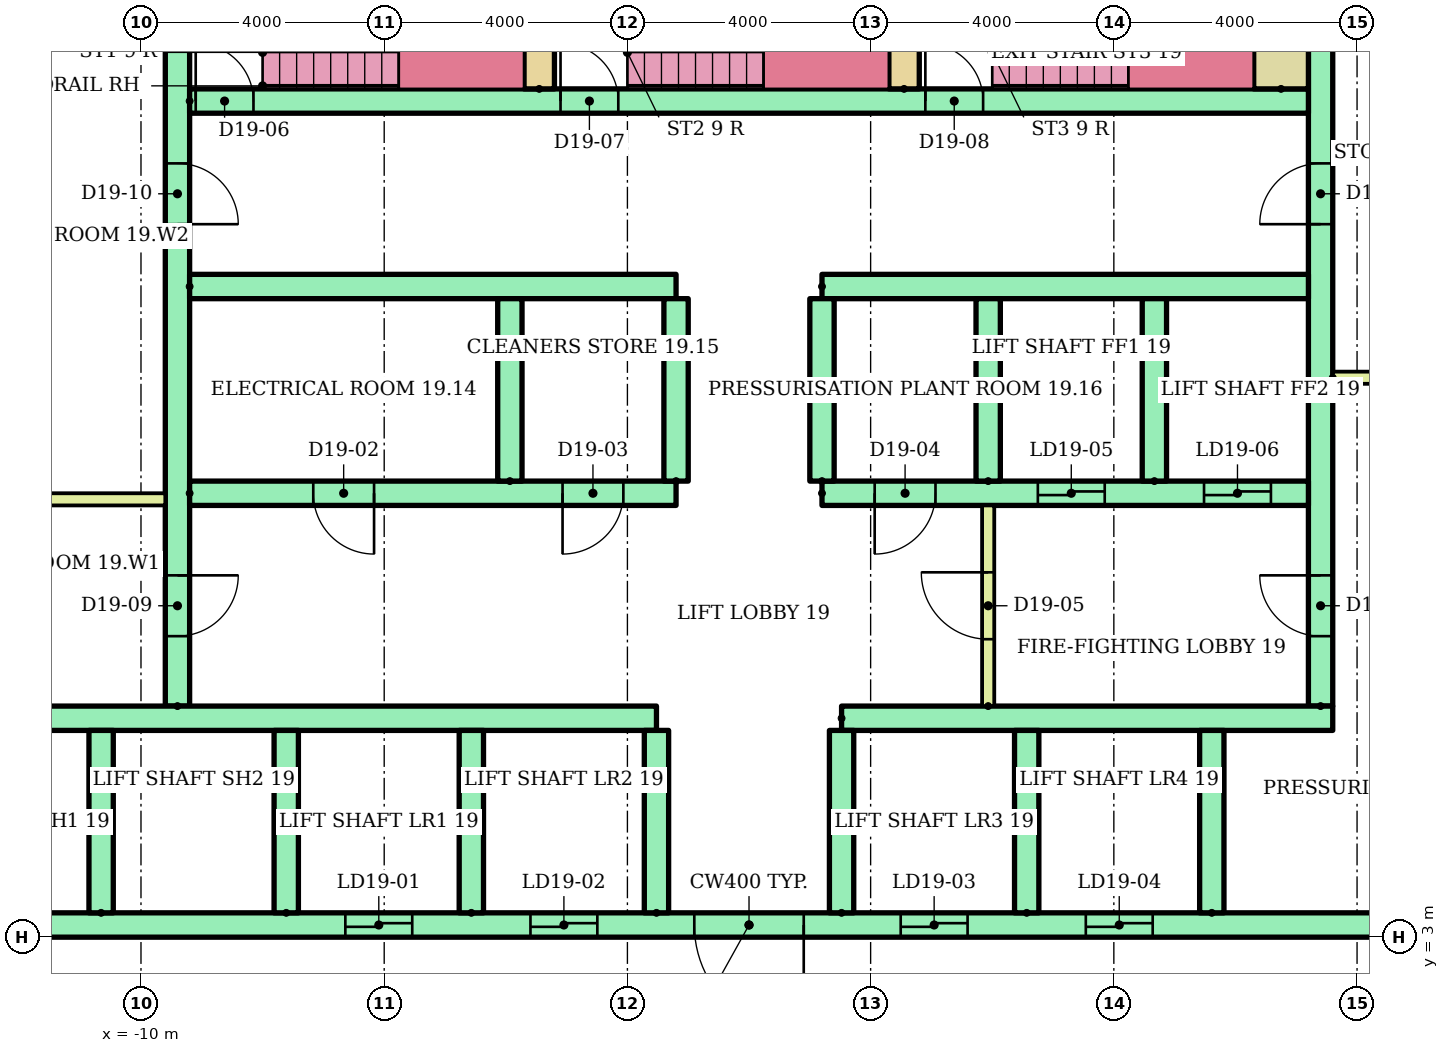
"""IFC4 building model, lengths in metres.
Left out: names, types, materials, properties, quantities, classifications, styles, units other than length and angle.
Written with IfcOpenShell. Run it as: python <this file> out.ifc"""

import sys

from ifc_helpers import new_model, si_unit, direction, frame, frame_2d, origin, place, context, subcontext, project, spatial, rectangle, extrude, element, fill, save


model = new_model("IFC4")
c1 = context("Model", 3, precision=1e-05, world=origin(), true_north=direction((0.0, 1.0)))
c2 = subcontext(c1, "Body", "Model", "MODEL_VIEW")
j1 = project(units=[si_unit("LENGTHUNIT", "METRE"), si_unit("PLANEANGLEUNIT", "RADIAN")], contexts=[c1])
p1 = place(None, origin())
s1 = spatial("IfcSite", under=j1, at=p1, CompositionType="ELEMENT")
p2 = place(p1, origin())
s2 = spatial("IfcBuilding", under=s1, at=p2, CompositionType="ELEMENT")
p3 = place(p2, frame((0.0, 0.0, 77.5)))
s3 = spatial("IfcBuildingStorey", under=s2, at=p3, CompositionType="ELEMENT", Elevation=77.5)
p4 = place(p3, frame((-9.4, 6.8, 0.0), z_axis=(0.0, 0.0, 1.0), x_axis=(0.0, 1.0, 0.0)))
e1 = element("IfcWall", 1, at=p4, inside=s3, PredefinedType="SHEAR", context=c2, shape_type="SweptSolid", body=[
    extrude(rectangle(XDim=12.7, YDim=0.4, at=frame_2d((6.35, 0.0))), origin(), (0.0, 0.0, 1.0), 2.92),
])
p5 = place(p4, frame((1.15, 0.0, 0.0)))
e2 = element("IfcOpeningElement", 2, at=p5, cuts=e1, PredefinedType="OPENING", context=c2, shape_type="SweptSolid", body=[
    extrude(rectangle(XDim=1.0, YDim=2.1, at=frame_2d((0.5, 1.05))), frame((0.0, 0.21, 0.0), z_axis=(0.0, -1.0, 0.0), x_axis=(1.0, 0.0, 0.0)), (0.0, 0.0, 1.0), 0.42),
])
p6 = place(p4, frame((7.925, 0.0, 0.0)))
e3 = element("IfcOpeningElement", 3, at=p6, cuts=e1, PredefinedType="OPENING", context=c2, shape_type="SweptSolid", body=[
    extrude(rectangle(XDim=1.0, YDim=2.1, at=frame_2d((0.5, 1.05))), frame((0.0, 0.21, 0.0), z_axis=(0.0, -1.0, 0.0), x_axis=(1.0, 0.0, 0.0)), (0.0, 0.0, 1.0), 0.42),
])
p7 = place(p3, frame((9.4, 6.8, 0.0), z_axis=(0.0, 0.0, 1.0), x_axis=(0.0, 1.0, 0.0)))
e4 = element("IfcWall", 4, at=p7, inside=s3, PredefinedType="SHEAR", context=c2, shape_type="SweptSolid", body=[
    extrude(rectangle(XDim=12.7, YDim=0.4, at=frame_2d((6.35, 0.0))), origin(), (0.0, 0.0, 1.0), 2.92),
])
p8 = place(p7, frame((1.15, 0.0, 0.0)))
e5 = element("IfcOpeningElement", 5, at=p8, cuts=e4, PredefinedType="OPENING", context=c2, shape_type="SweptSolid", body=[
    extrude(rectangle(XDim=1.0, YDim=2.1, at=frame_2d((0.5, 1.05))), frame((0.0, 0.21, 0.0), z_axis=(0.0, -1.0, 0.0), x_axis=(1.0, 0.0, 0.0)), (0.0, 0.0, 1.0), 0.42),
])
p9 = place(p7, frame((7.925, 0.0, 0.0)))
e6 = element("IfcOpeningElement", 6, at=p9, cuts=e4, PredefinedType="OPENING", context=c2, shape_type="SweptSolid", body=[
    extrude(rectangle(XDim=1.0, YDim=2.1, at=frame_2d((0.5, 1.05))), frame((0.0, 0.21, 0.0), z_axis=(0.0, -1.0, 0.0), x_axis=(1.0, 0.0, 0.0)), (0.0, 0.0, 1.0), 0.42),
])
p10 = place(p3, frame((-13.5, 3.2, 0.0)))
e7 = element("IfcWall", 7, at=p10, inside=s3, PredefinedType="SHEAR", context=c2, shape_type="SweptSolid", body=[
    extrude(rectangle(XDim=27.0, YDim=0.4, at=frame_2d((13.5, 0.0))), origin(), (0.0, 0.0, 1.0), 2.92),
])
p11 = place(p10, frame((6.861, 0.0, 0.0)))
e8 = element("IfcOpeningElement", 8, at=p11, cuts=e7, PredefinedType="OPENING", context=c2, shape_type="SweptSolid", body=[
    extrude(rectangle(XDim=1.1, YDim=2.1, at=frame_2d((0.55, 1.05))), frame((0.0, 0.21, 0.0), z_axis=(0.0, -1.0, 0.0), x_axis=(1.0, 0.0, 0.0)), (0.0, 0.0, 1.0), 0.42),
])
p12 = place(p10, frame((9.906, 0.0, 0.0)))
e9 = element("IfcOpeningElement", 9, at=p12, cuts=e7, PredefinedType="OPENING", context=c2, shape_type="SweptSolid", body=[
    extrude(rectangle(XDim=1.1, YDim=2.1, at=frame_2d((0.55, 1.05))), frame((0.0, 0.21, 0.0), z_axis=(0.0, -1.0, 0.0), x_axis=(1.0, 0.0, 0.0)), (0.0, 0.0, 1.0), 0.42),
])
p13 = place(p10, frame((15.994, 0.0, 0.0)))
e10 = element("IfcOpeningElement", 10, at=p13, cuts=e7, PredefinedType="OPENING", context=c2, shape_type="SweptSolid", body=[
    extrude(rectangle(XDim=1.1, YDim=2.1, at=frame_2d((0.55, 1.05))), frame((0.0, 0.21, 0.0), z_axis=(0.0, -1.0, 0.0), x_axis=(1.0, 0.0, 0.0)), (0.0, 0.0, 1.0), 0.42),
])
p14 = place(p10, frame((19.039, 0.0, 0.0)))
e11 = element("IfcOpeningElement", 11, at=p14, cuts=e7, PredefinedType="OPENING", context=c2, shape_type="SweptSolid", body=[
    extrude(rectangle(XDim=1.1, YDim=2.1, at=frame_2d((0.55, 1.05))), frame((0.0, 0.21, 0.0), z_axis=(0.0, -1.0, 0.0), x_axis=(1.0, 0.0, 0.0)), (0.0, 0.0, 1.0), 0.42),
])
p15 = place(p10, frame((12.6, 0.0, 0.0)))
e12 = element("IfcOpeningElement", 12, at=p15, cuts=e7, PredefinedType="OPENING", context=c2, shape_type="SweptSolid", body=[
    extrude(rectangle(XDim=1.8, YDim=2.1, at=frame_2d((0.9, 1.05))), frame((0.0, 0.21, 0.0), z_axis=(0.0, -1.0, 0.0), x_axis=(1.0, 0.0, 0.0)), (0.0, 0.0, 1.0), 0.42),
])
p16 = place(p3, frame((-13.5, 6.6, 0.0)))
e13 = element("IfcWall", 13, at=p16, inside=s3, PredefinedType="SHEAR", context=c2, shape_type="SweptSolid", body=[
    extrude(rectangle(XDim=11.978, YDim=0.4, at=frame_2d((5.989, 0.0))), origin(), (0.0, 0.0, 1.0), 2.92),
])
p17 = place(p3, frame((1.522, 6.6, 0.0)))
e14 = element("IfcWall", 14, at=p17, inside=s3, PredefinedType="SHEAR", context=c2, shape_type="SweptSolid", body=[
    extrude(rectangle(XDim=8.078, YDim=0.4, at=frame_2d((4.039, 0.0))), origin(), (0.0, 0.0, 1.0), 2.92),
])
for number, where, z_axis, x_axis in (
    (15, (-10.656, 3.4, 0.0), (0.0, 0.0, 1.0), (0.0, 1.0, 0.0)),
    (16, (-7.611, 3.4, 0.0), (0.0, 0.0, 1.0), (0.0, 1.0, 0.0)),
    (17, (-4.567, 3.4, 0.0), (0.0, 0.0, 1.0), (0.0, 1.0, 0.0)),
    (18, (-1.522, 3.4, 0.0), (0.0, 0.0, 1.0), (0.0, 1.0, 0.0)),
    (19, (1.522, 3.4, 0.0), (0.0, 0.0, 1.0), (0.0, 1.0, 0.0)),
    (20, (4.567, 3.4, 0.0), (0.0, 0.0, 1.0), (0.0, 1.0, 0.0)),
    (21, (7.611, 3.4, 0.0), (0.0, 0.0, 1.0), (0.0, 1.0, 0.0)),
):
    element("IfcWall", number, at=place(p3, frame(where, z_axis=z_axis, x_axis=x_axis)), inside=s3, PredefinedType="SHEAR", context=c2, shape_type="SweptSolid", body=[
        extrude(rectangle(XDim=3.0, YDim=0.4, at=frame_2d((1.5, 0.0))), origin(), (0.0, 0.0, 1.0), 2.92),
    ])
p18 = place(p3, frame((-9.2, 10.3, 0.0)))
e22 = element("IfcWall", 22, at=p18, inside=s3, PredefinedType="SHEAR", context=c2, shape_type="SweptSolid", body=[
    extrude(rectangle(XDim=8.0, YDim=0.4, at=frame_2d((4.0, 0.0))), origin(), (0.0, 0.0, 1.0), 2.92),
])
p19 = place(p18, frame((2.033, 0.0, 0.0)))
e23 = element("IfcOpeningElement", 23, at=p19, cuts=e22, PredefinedType="OPENING", context=c2, shape_type="SweptSolid", body=[
    extrude(rectangle(XDim=1.0, YDim=2.1, at=frame_2d((0.5, 1.05))), frame((0.0, 0.21, 0.0), z_axis=(0.0, -1.0, 0.0), x_axis=(1.0, 0.0, 0.0)), (0.0, 0.0, 1.0), 0.42),
])
p20 = place(p18, frame((6.133, 0.0, 0.0)))
e24 = element("IfcOpeningElement", 24, at=p20, cuts=e22, PredefinedType="OPENING", context=c2, shape_type="SweptSolid", body=[
    extrude(rectangle(XDim=1.0, YDim=2.1, at=frame_2d((0.5, 1.05))), frame((0.0, 0.21, 0.0), z_axis=(0.0, -1.0, 0.0), x_axis=(1.0, 0.0, 0.0)), (0.0, 0.0, 1.0), 0.42),
])
p21 = place(p3, frame((-9.2, 13.7, 0.0)))
e25 = element("IfcWall", 25, at=p21, inside=s3, PredefinedType="SHEAR", context=c2, shape_type="SweptSolid", body=[
    extrude(rectangle(XDim=8.0, YDim=0.4, at=frame_2d((4.0, 0.0))), origin(), (0.0, 0.0, 1.0), 2.92),
])
p22 = place(p3, frame((1.2, 10.3, 0.0)))
e26 = element("IfcWall", 26, at=p22, inside=s3, PredefinedType="SHEAR", context=c2, shape_type="SweptSolid", body=[
    extrude(rectangle(XDim=8.0, YDim=0.4, at=frame_2d((4.0, 0.0))), origin(), (0.0, 0.0, 1.0), 2.92),
])
p23 = place(p22, frame((3.55, 0.0, 0.0)))
e27 = element("IfcOpeningElement", 27, at=p23, cuts=e26, PredefinedType="OPENING", context=c2, shape_type="SweptSolid", body=[
    extrude(rectangle(XDim=1.1, YDim=2.1, at=frame_2d((0.55, 1.05))), frame((0.0, 0.21, 0.0), z_axis=(0.0, -1.0, 0.0), x_axis=(1.0, 0.0, 0.0)), (0.0, 0.0, 1.0), 0.42),
])
p24 = place(p22, frame((6.283, 0.0, 0.0)))
e28 = element("IfcOpeningElement", 28, at=p24, cuts=e26, PredefinedType="OPENING", context=c2, shape_type="SweptSolid", body=[
    extrude(rectangle(XDim=1.1, YDim=2.1, at=frame_2d((0.55, 1.05))), frame((0.0, 0.21, 0.0), z_axis=(0.0, -1.0, 0.0), x_axis=(1.0, 0.0, 0.0)), (0.0, 0.0, 1.0), 0.42),
])
p25 = place(p22, frame((0.867, 0.0, 0.0)))
e29 = element("IfcOpeningElement", 29, at=p25, cuts=e26, PredefinedType="OPENING", context=c2, shape_type="SweptSolid", body=[
    extrude(rectangle(XDim=1.0, YDim=2.1, at=frame_2d((0.5, 1.05))), frame((0.0, 0.21, 0.0), z_axis=(0.0, -1.0, 0.0), x_axis=(1.0, 0.0, 0.0)), (0.0, 0.0, 1.0), 0.42),
])
p26 = place(p3, frame((1.2, 13.7, 0.0)))
e30 = element("IfcWall", 30, at=p26, inside=s3, PredefinedType="SHEAR", context=c2, shape_type="SweptSolid", body=[
    extrude(rectangle(XDim=8.0, YDim=0.4, at=frame_2d((4.0, 0.0))), origin(), (0.0, 0.0, 1.0), 2.92),
])
for number, where, z_axis, x_axis in (
    (31, (-3.933, 10.5, 0.0), (0.0, 0.0, 1.0), (0.0, 1.0, 0.0)),
    (32, (-1.2, 10.5, 0.0), (0.0, 0.0, 1.0), (0.0, 1.0, 0.0)),
    (33, (1.2, 10.5, 0.0), (0.0, 0.0, 1.0), (0.0, 1.0, 0.0)),
    (34, (3.933, 10.5, 0.0), (0.0, 0.0, 1.0), (0.0, 1.0, 0.0)),
    (35, (6.667, 10.5, 0.0), (0.0, 0.0, 1.0), (0.0, 1.0, 0.0)),
):
    element("IfcWall", number, at=place(p3, frame(where, z_axis=z_axis, x_axis=x_axis)), inside=s3, PredefinedType="SHEAR", context=c2, shape_type="SweptSolid", body=[
        extrude(rectangle(XDim=3.0, YDim=0.4, at=frame_2d((1.5, 0.0))), origin(), (0.0, 0.0, 1.0), 2.92),
    ])
p27 = place(p3, frame((3.933, 6.8, 0.0), z_axis=(0.0, 0.0, 1.0), x_axis=(0.0, 1.0, 0.0)))
e36 = element("IfcWall", 36, at=p27, inside=s3, PredefinedType="PARTITIONING", context=c2, shape_type="SweptSolid", body=[
    extrude(rectangle(XDim=3.3, YDim=0.2, at=frame_2d((1.65, 0.0))), origin(), (0.0, 0.0, 1.0), 2.92),
])
p28 = place(p27, frame((1.1, 0.0, 0.0)))
e37 = element("IfcOpeningElement", 37, at=p28, cuts=e36, PredefinedType="OPENING", context=c2, shape_type="SweptSolid", body=[
    extrude(rectangle(XDim=1.1, YDim=2.1, at=frame_2d((0.55, 1.05))), frame((0.0, 0.11, 0.0), z_axis=(0.0, -1.0, 0.0), x_axis=(1.0, 0.0, 0.0)), (0.0, 0.0, 1.0), 0.22),
])
p29 = place(p3, frame((-9.2, 16.75, 0.0)))
e38 = element("IfcWall", 38, at=p29, inside=s3, PredefinedType="SHEAR", context=c2, shape_type="SweptSolid", body=[
    extrude(rectangle(XDim=18.4, YDim=0.4, at=frame_2d((9.2, 0.0))), origin(), (0.0, 0.0, 1.0), 2.92),
])
p30 = place(p29, frame((0.1, 0.0, 0.0)))
e39 = element("IfcOpeningElement", 39, at=p30, cuts=e38, PredefinedType="OPENING", context=c2, shape_type="SweptSolid", body=[
    extrude(rectangle(XDim=0.95, YDim=2.1, at=frame_2d((0.475, 1.05))), frame((0.0, 0.21, 0.0), z_axis=(0.0, -1.0, 0.0), x_axis=(1.0, 0.0, 0.0)), (0.0, 0.0, 1.0), 0.42),
])
p31 = place(p29, frame((6.1, 0.0, 0.0)))
e40 = element("IfcOpeningElement", 40, at=p31, cuts=e38, PredefinedType="OPENING", context=c2, shape_type="SweptSolid", body=[
    extrude(rectangle(XDim=0.95, YDim=2.1, at=frame_2d((0.475, 1.05))), frame((0.0, 0.21, 0.0), z_axis=(0.0, -1.0, 0.0), x_axis=(1.0, 0.0, 0.0)), (0.0, 0.0, 1.0), 0.42),
])
p32 = place(p29, frame((12.1, 0.0, 0.0)))
e41 = element("IfcOpeningElement", 41, at=p32, cuts=e38, PredefinedType="OPENING", context=c2, shape_type="SweptSolid", body=[
    extrude(rectangle(XDim=0.95, YDim=2.1, at=frame_2d((0.475, 1.05))), frame((0.0, 0.21, 0.0), z_axis=(0.0, -1.0, 0.0), x_axis=(1.0, 0.0, 0.0)), (0.0, 0.0, 1.0), 0.42),
])
for number, where, z_axis, x_axis in (
    (42, (-3.45, 16.95, 0.0), (0.0, 0.0, 1.0), (0.0, 1.0, 0.0)),
    (43, (2.55, 16.95, 0.0), (0.0, 0.0, 1.0), (0.0, 1.0, 0.0)),
):
    element("IfcWall", number, at=place(p3, frame(where, z_axis=z_axis, x_axis=x_axis)), inside=s3, PredefinedType="SHEAR", context=c2, shape_type="SweptSolid", body=[
        extrude(rectangle(XDim=2.55, YDim=0.5, at=frame_2d((1.275, 0.0))), origin(), (0.0, 0.0, 1.0), 2.92),
    ])
p33 = place(p3, frame((8.75, 16.95, 0.0), z_axis=(0.0, 0.0, 1.0), x_axis=(0.0, 1.0, 0.0)))
e44 = element("IfcWall", 44, at=p33, inside=s3, PredefinedType="SHEAR", context=c2, shape_type="SweptSolid", body=[
    extrude(rectangle(XDim=2.55, YDim=0.9, at=frame_2d((1.275, 0.0))), origin(), (0.0, 0.0, 1.0), 2.92),
])
for number, where in (
    (45, (-13.5, 10.2, 0.0)),
    (46, (9.6, 12.2, 0.0)),
):
    element("IfcWall", number, at=place(p3, frame(where)), inside=s3, PredefinedType="PARTITIONING", context=c2, shape_type="SweptSolid", body=[
        extrude(rectangle(XDim=3.9, YDim=0.2, at=frame_2d((1.95, 0.0))), origin(), (0.0, 0.0, 1.0), 2.92),
    ])
p34 = place(p11, origin())
e47 = element("IfcDoor", 47, at=p34, inside=s3, OperationType="SLIDING_TO_LEFT", PredefinedType="DOOR", context=c2, shape_type="SweptSolid", body=[
    extrude(rectangle(XDim=1.1, YDim=2.1, at=frame_2d((0.55, 1.05))), frame((0.0, 0.025, 0.0), z_axis=(0.0, -1.0, 0.0), x_axis=(1.0, 0.0, 0.0)), (0.0, 0.0, 1.0), 0.05),
])
fill(e8, e47)
p35 = place(p12, origin())
e48 = element("IfcDoor", 48, at=p35, inside=s3, OperationType="SLIDING_TO_LEFT", PredefinedType="DOOR", context=c2, shape_type="SweptSolid", body=[
    extrude(rectangle(XDim=1.1, YDim=2.1, at=frame_2d((0.55, 1.05))), frame((0.0, 0.025, 0.0), z_axis=(0.0, -1.0, 0.0), x_axis=(1.0, 0.0, 0.0)), (0.0, 0.0, 1.0), 0.05),
])
fill(e9, e48)
p36 = place(p13, origin())
e49 = element("IfcDoor", 49, at=p36, inside=s3, OperationType="SLIDING_TO_LEFT", PredefinedType="DOOR", context=c2, shape_type="SweptSolid", body=[
    extrude(rectangle(XDim=1.1, YDim=2.1, at=frame_2d((0.55, 1.05))), frame((0.0, 0.025, 0.0), z_axis=(0.0, -1.0, 0.0), x_axis=(1.0, 0.0, 0.0)), (0.0, 0.0, 1.0), 0.05),
])
fill(e10, e49)
p37 = place(p14, origin())
e50 = element("IfcDoor", 50, at=p37, inside=s3, OperationType="SLIDING_TO_LEFT", PredefinedType="DOOR", context=c2, shape_type="SweptSolid", body=[
    extrude(rectangle(XDim=1.1, YDim=2.1, at=frame_2d((0.55, 1.05))), frame((0.0, 0.025, 0.0), z_axis=(0.0, -1.0, 0.0), x_axis=(1.0, 0.0, 0.0)), (0.0, 0.0, 1.0), 0.05),
])
fill(e11, e50)
p38 = place(p15, frame((1.8, 0.0, 0.0), z_axis=(0.0, 0.0, 1.0), x_axis=(-1.0, 0.0, 0.0)))
e51 = element("IfcDoor", 51, at=p38, inside=s3, OperationType="DOUBLE_DOOR_SINGLE_SWING", PredefinedType="DOOR", context=c2, shape_type="SweptSolid", body=[
    extrude(rectangle(XDim=1.8, YDim=2.1, at=frame_2d((0.9, 1.05))), frame((0.0, 0.025, 0.0), z_axis=(0.0, -1.0, 0.0), x_axis=(1.0, 0.0, 0.0)), (0.0, 0.0, 1.0), 0.05),
])
fill(e12, e51)
p39 = place(p23, origin())
e52 = element("IfcDoor", 52, at=p39, inside=s3, OperationType="SLIDING_TO_LEFT", PredefinedType="DOOR", context=c2, shape_type="SweptSolid", body=[
    extrude(rectangle(XDim=1.1, YDim=2.1, at=frame_2d((0.55, 1.05))), frame((0.0, 0.025, 0.0), z_axis=(0.0, -1.0, 0.0), x_axis=(1.0, 0.0, 0.0)), (0.0, 0.0, 1.0), 0.05),
])
fill(e27, e52)
p40 = place(p24, origin())
e53 = element("IfcDoor", 53, at=p40, inside=s3, OperationType="SLIDING_TO_LEFT", PredefinedType="DOOR", context=c2, shape_type="SweptSolid", body=[
    extrude(rectangle(XDim=1.1, YDim=2.1, at=frame_2d((0.55, 1.05))), frame((0.0, 0.025, 0.0), z_axis=(0.0, -1.0, 0.0), x_axis=(1.0, 0.0, 0.0)), (0.0, 0.0, 1.0), 0.05),
])
fill(e28, e53)
p41 = place(p19, frame((1.0, 0.0, 0.0), z_axis=(0.0, 0.0, 1.0), x_axis=(-1.0, 0.0, 0.0)))
e54 = element("IfcDoor", 54, at=p41, inside=s3, OperationType="SINGLE_SWING_RIGHT", PredefinedType="DOOR", context=c2, shape_type="SweptSolid", body=[
    extrude(rectangle(XDim=1.0, YDim=2.1, at=frame_2d((0.5, 1.05))), frame((0.0, 0.025, 0.0), z_axis=(0.0, -1.0, 0.0), x_axis=(1.0, 0.0, 0.0)), (0.0, 0.0, 1.0), 0.05),
])
fill(e23, e54)
p42 = place(p20, frame((1.0, 0.0, 0.0), z_axis=(0.0, 0.0, 1.0), x_axis=(-1.0, 0.0, 0.0)))
e55 = element("IfcDoor", 55, at=p42, inside=s3, OperationType="SINGLE_SWING_LEFT", PredefinedType="DOOR", context=c2, shape_type="SweptSolid", body=[
    extrude(rectangle(XDim=1.0, YDim=2.1, at=frame_2d((0.5, 1.05))), frame((0.0, 0.025, 0.0), z_axis=(0.0, -1.0, 0.0), x_axis=(1.0, 0.0, 0.0)), (0.0, 0.0, 1.0), 0.05),
])
fill(e24, e55)
p43 = place(p25, frame((1.0, 0.0, 0.0), z_axis=(0.0, 0.0, 1.0), x_axis=(-1.0, 0.0, 0.0)))
e56 = element("IfcDoor", 56, at=p43, inside=s3, OperationType="SINGLE_SWING_LEFT", PredefinedType="DOOR", context=c2, shape_type="SweptSolid", body=[
    extrude(rectangle(XDim=1.0, YDim=2.1, at=frame_2d((0.5, 1.05))), frame((0.0, 0.025, 0.0), z_axis=(0.0, -1.0, 0.0), x_axis=(1.0, 0.0, 0.0)), (0.0, 0.0, 1.0), 0.05),
])
fill(e29, e56)
p44 = place(p28, origin())
e57 = element("IfcDoor", 57, at=p44, inside=s3, OperationType="SINGLE_SWING_RIGHT", PredefinedType="DOOR", context=c2, shape_type="SweptSolid", body=[
    extrude(rectangle(XDim=1.1, YDim=2.1, at=frame_2d((0.55, 1.05))), frame((0.0, 0.025, 0.0), z_axis=(0.0, -1.0, 0.0), x_axis=(1.0, 0.0, 0.0)), (0.0, 0.0, 1.0), 0.05),
])
fill(e37, e57)
p45 = place(p30, origin())
e58 = element("IfcDoor", 58, at=p45, inside=s3, OperationType="SINGLE_SWING_LEFT", PredefinedType="DOOR", context=c2, shape_type="SweptSolid", body=[
    extrude(rectangle(XDim=0.95, YDim=2.1, at=frame_2d((0.475, 1.05))), frame((0.0, 0.025, 0.0), z_axis=(0.0, -1.0, 0.0), x_axis=(1.0, 0.0, 0.0)), (0.0, 0.0, 1.0), 0.05),
])
fill(e39, e58)
p46 = place(p31, origin())
e59 = element("IfcDoor", 59, at=p46, inside=s3, OperationType="SINGLE_SWING_LEFT", PredefinedType="DOOR", context=c2, shape_type="SweptSolid", body=[
    extrude(rectangle(XDim=0.95, YDim=2.1, at=frame_2d((0.475, 1.05))), frame((0.0, 0.025, 0.0), z_axis=(0.0, -1.0, 0.0), x_axis=(1.0, 0.0, 0.0)), (0.0, 0.0, 1.0), 0.05),
])
fill(e40, e59)
p47 = place(p32, origin())
e60 = element("IfcDoor", 60, at=p47, inside=s3, OperationType="SINGLE_SWING_LEFT", PredefinedType="DOOR", context=c2, shape_type="SweptSolid", body=[
    extrude(rectangle(XDim=0.95, YDim=2.1, at=frame_2d((0.475, 1.05))), frame((0.0, 0.025, 0.0), z_axis=(0.0, -1.0, 0.0), x_axis=(1.0, 0.0, 0.0)), (0.0, 0.0, 1.0), 0.05),
])
fill(e41, e60)
p48 = place(p5, frame((1.0, 0.0, 0.0), z_axis=(0.0, 0.0, 1.0), x_axis=(-1.0, 0.0, 0.0)))
e61 = element("IfcDoor", 61, at=p48, inside=s3, OperationType="SINGLE_SWING_RIGHT", PredefinedType="DOOR", context=c2, shape_type="SweptSolid", body=[
    extrude(rectangle(XDim=1.0, YDim=2.1, at=frame_2d((0.5, 1.05))), frame((0.0, 0.025, 0.0), z_axis=(0.0, -1.0, 0.0), x_axis=(1.0, 0.0, 0.0)), (0.0, 0.0, 1.0), 0.05),
])
fill(e2, e61)
p49 = place(p6, frame((1.0, 0.0, 0.0), z_axis=(0.0, 0.0, 1.0), x_axis=(-1.0, 0.0, 0.0)))
e62 = element("IfcDoor", 62, at=p49, inside=s3, OperationType="SINGLE_SWING_LEFT", PredefinedType="DOOR", context=c2, shape_type="SweptSolid", body=[
    extrude(rectangle(XDim=1.0, YDim=2.1, at=frame_2d((0.5, 1.05))), frame((0.0, 0.025, 0.0), z_axis=(0.0, -1.0, 0.0), x_axis=(1.0, 0.0, 0.0)), (0.0, 0.0, 1.0), 0.05),
])
fill(e3, e62)
p50 = place(p8, origin())
e63 = element("IfcDoor", 63, at=p50, inside=s3, OperationType="SINGLE_SWING_RIGHT", PredefinedType="DOOR", context=c2, shape_type="SweptSolid", body=[
    extrude(rectangle(XDim=1.0, YDim=2.1, at=frame_2d((0.5, 1.05))), frame((0.0, 0.025, 0.0), z_axis=(0.0, -1.0, 0.0), x_axis=(1.0, 0.0, 0.0)), (0.0, 0.0, 1.0), 0.05),
])
fill(e5, e63)
p51 = place(p9, origin())
e64 = element("IfcDoor", 64, at=p51, inside=s3, OperationType="SINGLE_SWING_LEFT", PredefinedType="DOOR", context=c2, shape_type="SweptSolid", body=[
    extrude(rectangle(XDim=1.0, YDim=2.1, at=frame_2d((0.5, 1.05))), frame((0.0, 0.025, 0.0), z_axis=(0.0, -1.0, 0.0), x_axis=(1.0, 0.0, 0.0)), (0.0, 0.0, 1.0), 0.05),
])
fill(e6, e64)
save(model, sys.argv[1])
